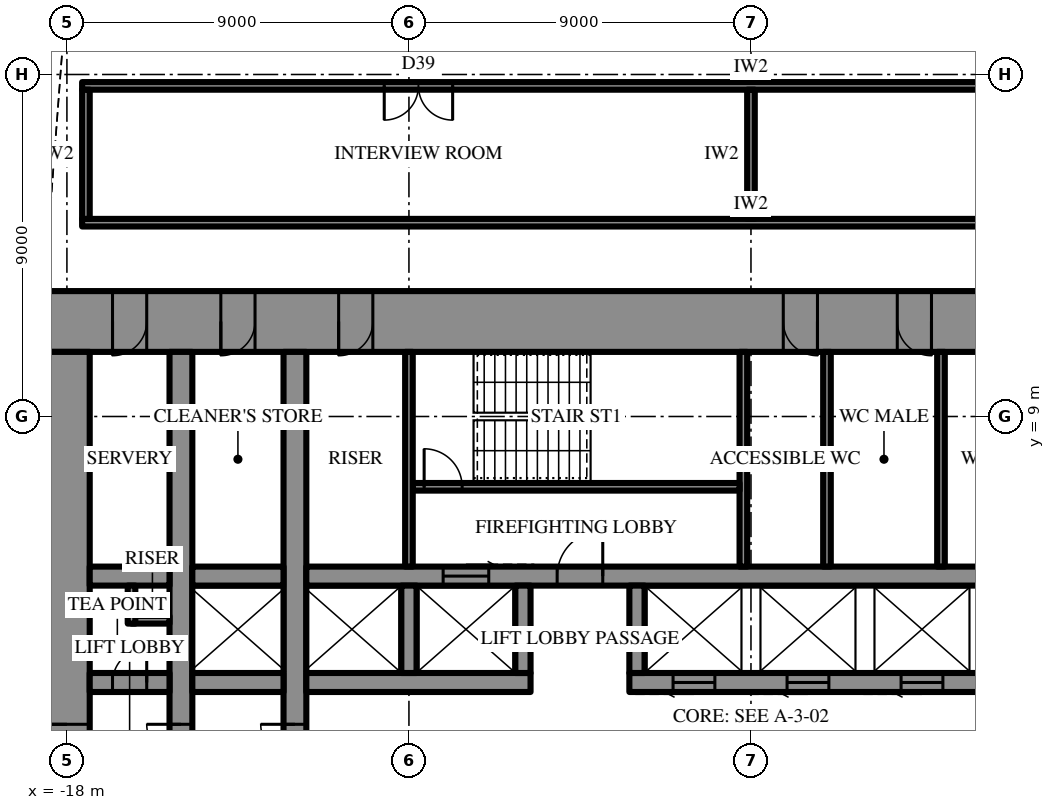
"""IFC4 building model, lengths in metres.
Left out: names, types, materials, properties, quantities, classifications, styles, units other than length and angle.
Written with IfcOpenShell. Run it as: python <this file> out.ifc"""

import sys

from ifc_helpers import new_model, si_unit, direction, frame, frame_2d, origin, place, context, subcontext, project, spatial, rectangle, extrude, element, fill, save


model = new_model("IFC4")
c1 = context("Model", 3, precision=1e-05, world=origin(), true_north=direction((0.0, 1.0)))
c2 = subcontext(c1, "Body", "Model", "MODEL_VIEW")
j1 = project(units=[si_unit("LENGTHUNIT", "METRE"), si_unit("PLANEANGLEUNIT", "RADIAN")], contexts=[c1])
p1 = place(None, origin())
s1 = spatial("IfcSite", under=j1, at=p1, CompositionType="ELEMENT")
p2 = place(p1, origin())
s2 = spatial("IfcBuilding", under=s1, at=p2, CompositionType="ELEMENT")
p3 = place(p2, frame((0.0, 0.0, 169.9)))
s3 = spatial("IfcBuildingStorey", under=s2, at=p3, CompositionType="ELEMENT", Elevation=169.9)
p4 = place(p3, frame((-18.6, 11.5, 0.0), z_axis=(0.0, 0.0, 1.0), x_axis=(1.0, 0.0, 0.0)))
e1 = element("IfcWall", 1, at=p4, inside=s3, PredefinedType="SHEAR", context=c2, shape_type="SweptSolid", body=[
    extrude(rectangle(XDim=37.2, YDim=1.6, at=frame_2d((18.6, 0.0))), origin(), (0.0, 0.0, 1.0), 4.2),
])
p5 = place(p4, frame((19.45, 0.0, 0.0)))
e2 = element("IfcOpeningElement", 2, at=p5, cuts=e1, PredefinedType="OPENING", context=c2, shape_type="SweptSolid", body=[
    extrude(rectangle(XDim=0.9, YDim=2.2, at=frame_2d((0.45, 1.1))), frame((0.0, 0.81, 0.0), z_axis=(0.0, -1.0, 0.0), x_axis=(1.0, 0.0, 0.0)), (0.0, 0.0, 1.0), 1.62),
])
p6 = place(p4, frame((22.45, 0.0, 0.0)))
e3 = element("IfcOpeningElement", 3, at=p6, cuts=e1, PredefinedType="OPENING", context=c2, shape_type="SweptSolid", body=[
    extrude(rectangle(XDim=0.9, YDim=2.2, at=frame_2d((0.45, 1.1))), frame((0.0, 0.81, 0.0), z_axis=(0.0, -1.0, 0.0), x_axis=(1.0, 0.0, 0.0)), (0.0, 0.0, 1.0), 1.62),
])
p7 = place(p4, frame((25.5, 0.0, 0.0)))
e4 = element("IfcOpeningElement", 4, at=p7, cuts=e1, PredefinedType="OPENING", context=c2, shape_type="SweptSolid", body=[
    extrude(rectangle(XDim=1.0, YDim=2.2, at=frame_2d((0.5, 1.1))), frame((0.0, 0.81, 0.0), z_axis=(0.0, -1.0, 0.0), x_axis=(1.0, 0.0, 0.0)), (0.0, 0.0, 1.0), 1.62),
])
p8 = place(p4, frame((1.8, 0.0, 0.0)))
e5 = element("IfcOpeningElement", 5, at=p8, cuts=e1, PredefinedType="OPENING", context=c2, shape_type="SweptSolid", body=[
    extrude(rectangle(XDim=0.9, YDim=2.2, at=frame_2d((0.45, 1.1))), frame((0.0, 0.81, 0.0), z_axis=(0.0, -1.0, 0.0), x_axis=(1.0, 0.0, 0.0)), (0.0, 0.0, 1.0), 1.62),
])
p9 = place(p4, frame((4.65, 0.0, 0.0)))
e6 = element("IfcOpeningElement", 6, at=p9, cuts=e1, PredefinedType="OPENING", context=c2, shape_type="SweptSolid", body=[
    extrude(rectangle(XDim=0.9, YDim=2.2, at=frame_2d((0.45, 1.1))), frame((0.0, 0.81, 0.0), z_axis=(0.0, -1.0, 0.0), x_axis=(1.0, 0.0, 0.0)), (0.0, 0.0, 1.0), 1.62),
])
p10 = place(p4, frame((7.75, 0.0, 0.0)))
e7 = element("IfcOpeningElement", 7, at=p10, cuts=e1, PredefinedType="OPENING", context=c2, shape_type="SweptSolid", body=[
    extrude(rectangle(XDim=0.9, YDim=2.2, at=frame_2d((0.45, 1.1))), frame((0.0, 0.81, 0.0), z_axis=(0.0, -1.0, 0.0), x_axis=(1.0, 0.0, 0.0)), (0.0, 0.0, 1.0), 1.62),
])
p11 = place(p4, frame((28.55, 0.0, 0.0)))
e8 = element("IfcOpeningElement", 8, at=p11, cuts=e1, PredefinedType="OPENING", context=c2, shape_type="SweptSolid", body=[
    extrude(rectangle(XDim=0.9, YDim=2.2, at=frame_2d((0.45, 1.1))), frame((0.0, 0.81, 0.0), z_axis=(0.0, -1.0, 0.0), x_axis=(1.0, 0.0, 0.0)), (0.0, 0.0, 1.0), 1.62),
])
p12 = place(p4, frame((31.65, 0.0, 0.0)))
e9 = element("IfcOpeningElement", 9, at=p12, cuts=e1, PredefinedType="OPENING", context=c2, shape_type="SweptSolid", body=[
    extrude(rectangle(XDim=0.9, YDim=2.2, at=frame_2d((0.45, 1.1))), frame((0.0, 0.81, 0.0), z_axis=(0.0, -1.0, 0.0), x_axis=(1.0, 0.0, 0.0)), (0.0, 0.0, 1.0), 1.62),
])
p13 = place(p4, frame((34.5, 0.0, 0.0)))
e10 = element("IfcOpeningElement", 10, at=p13, cuts=e1, PredefinedType="OPENING", context=c2, shape_type="SweptSolid", body=[
    extrude(rectangle(XDim=0.9, YDim=2.2, at=frame_2d((0.45, 1.1))), frame((0.0, 0.81, 0.0), z_axis=(0.0, -1.0, 0.0), x_axis=(1.0, 0.0, 0.0)), (0.0, 0.0, 1.0), 1.62),
])
p14 = place(p3, frame((-18.0, 10.7, 0.0), z_axis=(0.0, 0.0, 1.0), x_axis=(0.0, -1.0, 0.0)))
e11 = element("IfcWall", 11, at=p14, inside=s3, PredefinedType="SHEAR", context=c2, shape_type="SweptSolid", body=[
    extrude(rectangle(XDim=21.4, YDim=1.2, at=frame_2d((10.7, 0.0))), origin(), (0.0, 0.0, 1.0), 4.2),
])
p15 = place(p14, frame((9.8, 0.0, 0.0)))
e12 = element("IfcOpeningElement", 12, at=p15, cuts=e11, PredefinedType="OPENING", context=c2, shape_type="SweptSolid", body=[
    extrude(rectangle(XDim=1.8, YDim=2.4, at=frame_2d((0.9, 1.2))), frame((0.0, 0.61, 0.0), z_axis=(0.0, -1.0, 0.0), x_axis=(1.0, 0.0, 0.0)), (0.0, 0.0, 1.0), 1.22),
])
p16 = place(p3, frame((-12.0, -10.7, 0.0), z_axis=(0.0, 0.0, 1.0), x_axis=(0.0, 1.0, 0.0)))
e13 = element("IfcWall", 13, at=p16, inside=s3, PredefinedType="SHEAR", context=c2, shape_type="SweptSolid", body=[
    extrude(rectangle(XDim=21.4, YDim=0.6, at=frame_2d((10.7, 0.0))), origin(), (0.0, 0.0, 1.0), 4.2),
])
p17 = place(p16, frame((9.8, 0.0, 0.0)))
e14 = element("IfcOpeningElement", 14, at=p17, cuts=e13, PredefinedType="OPENING", context=c2, shape_type="SweptSolid", body=[
    extrude(rectangle(XDim=1.8, YDim=2.4, at=frame_2d((0.9, 1.2))), frame((0.0, 0.31, 0.0), z_axis=(0.0, -1.0, 0.0), x_axis=(1.0, 0.0, 0.0)), (0.0, 0.0, 1.0), 0.62),
])
p18 = place(p3, frame((-15.0, -10.7, 0.0), z_axis=(0.0, 0.0, 1.0), x_axis=(0.0, 1.0, 0.0)))
e15 = element("IfcWall", 15, at=p18, inside=s3, PredefinedType="SHEAR", context=c2, shape_type="SweptSolid", body=[
    extrude(rectangle(XDim=21.4, YDim=0.6, at=frame_2d((10.7, 0.0))), origin(), (0.0, 0.0, 1.0), 4.2),
])
p19 = place(p18, frame((9.8, 0.0, 0.0)))
e16 = element("IfcOpeningElement", 16, at=p19, cuts=e15, PredefinedType="OPENING", context=c2, shape_type="SweptSolid", body=[
    extrude(rectangle(XDim=1.8, YDim=2.4, at=frame_2d((0.9, 1.2))), frame((0.0, 0.31, 0.0), z_axis=(0.0, -1.0, 0.0), x_axis=(1.0, 0.0, 0.0)), (0.0, 0.0, 1.0), 0.62),
])
p20 = place(p3, frame((-17.4, 2.0, 0.0), z_axis=(0.0, 0.0, 1.0), x_axis=(1.0, 0.0, 0.0)))
e17 = element("IfcWall", 17, at=p20, inside=s3, PredefinedType="SHEAR", context=c2, shape_type="SweptSolid", body=[
    extrude(rectangle(XDim=2.1, YDim=0.5, at=frame_2d((1.05, 0.0))), origin(), (0.0, 0.0, 1.0), 4.2),
])
p21 = place(p20, frame((0.6, 0.0, 0.0)))
e18 = element("IfcOpeningElement", 18, at=p21, cuts=e17, PredefinedType="OPENING", context=c2, shape_type="SweptSolid", body=[
    extrude(rectangle(XDim=0.9, YDim=2.2, at=frame_2d((0.45, 1.1))), frame((0.0, 0.26, 0.0), z_axis=(0.0, -1.0, 0.0), x_axis=(1.0, 0.0, 0.0)), (0.0, 0.0, 1.0), 0.52),
])
p22 = place(p3, frame((-14.7, 2.0, 0.0), z_axis=(0.0, 0.0, 1.0), x_axis=(1.0, 0.0, 0.0)))
e19 = element("IfcWall", 19, at=p22, inside=s3, PredefinedType="SHEAR", context=c2, shape_type="SweptSolid", body=[
    extrude(rectangle(XDim=2.4, YDim=0.5, at=frame_2d((1.2, 0.0))), origin(), (0.0, 0.0, 1.0), 4.2),
])
p23 = place(p3, frame((-11.7, 2.0, 0.0), z_axis=(0.0, 0.0, 1.0), x_axis=(1.0, 0.0, 0.0)))
e20 = element("IfcWall", 20, at=p23, inside=s3, PredefinedType="SHEAR", context=c2, shape_type="SweptSolid", body=[
    extrude(rectangle(XDim=5.9, YDim=0.5, at=frame_2d((2.95, 0.0))), origin(), (0.0, 0.0, 1.0), 4.2),
])
p24 = place(p3, frame((-3.2, 2.0, 0.0), z_axis=(0.0, 0.0, 1.0), x_axis=(1.0, 0.0, 0.0)))
e21 = element("IfcWall", 21, at=p24, inside=s3, PredefinedType="SHEAR", context=c2, shape_type="SweptSolid", body=[
    extrude(rectangle(XDim=14.9, YDim=0.5, at=frame_2d((7.45, 0.0))), origin(), (0.0, 0.0, 1.0), 4.2),
])
p25 = place(p24, frame((1.15, 0.0, 0.0)))
e22 = element("IfcOpeningElement", 22, at=p25, cuts=e21, PredefinedType="OPENING", context=c2, shape_type="SweptSolid", body=[
    extrude(rectangle(XDim=1.1, YDim=2.2, at=frame_2d((0.55, 1.1))), frame((0.0, 0.26, 0.0), z_axis=(0.0, -1.0, 0.0), x_axis=(1.0, 0.0, 0.0)), (0.0, 0.0, 1.0), 0.52),
])
p26 = place(p24, frame((4.15, 0.0, 0.0)))
e23 = element("IfcOpeningElement", 23, at=p26, cuts=e21, PredefinedType="OPENING", context=c2, shape_type="SweptSolid", body=[
    extrude(rectangle(XDim=1.1, YDim=2.2, at=frame_2d((0.55, 1.1))), frame((0.0, 0.26, 0.0), z_axis=(0.0, -1.0, 0.0), x_axis=(1.0, 0.0, 0.0)), (0.0, 0.0, 1.0), 0.52),
])
p27 = place(p24, frame((7.15, 0.0, 0.0)))
e24 = element("IfcOpeningElement", 24, at=p27, cuts=e21, PredefinedType="OPENING", context=c2, shape_type="SweptSolid", body=[
    extrude(rectangle(XDim=1.1, YDim=2.2, at=frame_2d((0.55, 1.1))), frame((0.0, 0.26, 0.0), z_axis=(0.0, -1.0, 0.0), x_axis=(1.0, 0.0, 0.0)), (0.0, 0.0, 1.0), 0.52),
])
p28 = place(p24, frame((10.15, 0.0, 0.0)))
e25 = element("IfcOpeningElement", 25, at=p28, cuts=e21, PredefinedType="OPENING", context=c2, shape_type="SweptSolid", body=[
    extrude(rectangle(XDim=1.1, YDim=2.2, at=frame_2d((0.55, 1.1))), frame((0.0, 0.26, 0.0), z_axis=(0.0, -1.0, 0.0), x_axis=(1.0, 0.0, 0.0)), (0.0, 0.0, 1.0), 0.52),
])
p29 = place(p3, frame((-17.4, 4.8, 0.0), z_axis=(0.0, 0.0, 1.0), x_axis=(1.0, 0.0, 0.0)))
e26 = element("IfcWall", 26, at=p29, inside=s3, PredefinedType="SHEAR", context=c2, shape_type="SweptSolid", body=[
    extrude(rectangle(XDim=2.1, YDim=0.5, at=frame_2d((1.05, 0.0))), origin(), (0.0, 0.0, 1.0), 4.2),
])
p30 = place(p3, frame((-14.7, 4.8, 0.0), z_axis=(0.0, 0.0, 1.0), x_axis=(1.0, 0.0, 0.0)))
e27 = element("IfcWall", 27, at=p30, inside=s3, PredefinedType="SHEAR", context=c2, shape_type="SweptSolid", body=[
    extrude(rectangle(XDim=2.4, YDim=0.5, at=frame_2d((1.2, 0.0))), origin(), (0.0, 0.0, 1.0), 4.2),
])
p31 = place(p3, frame((-11.7, 4.8, 0.0), z_axis=(0.0, 0.0, 1.0), x_axis=(1.0, 0.0, 0.0)))
e28 = element("IfcWall", 28, at=p31, inside=s3, PredefinedType="SHEAR", context=c2, shape_type="SweptSolid", body=[
    extrude(rectangle(XDim=23.4, YDim=0.5, at=frame_2d((11.7, 0.0))), origin(), (0.0, 0.0, 1.0), 4.2),
])
p32 = place(p31, frame((6.6, 0.0, 0.0)))
e29 = element("IfcOpeningElement", 29, at=p32, cuts=e28, PredefinedType="OPENING", context=c2, shape_type="SweptSolid", body=[
    extrude(rectangle(XDim=1.2, YDim=2.2, at=frame_2d((0.6, 1.1))), frame((0.0, 0.26, 0.0), z_axis=(0.0, -1.0, 0.0), x_axis=(1.0, 0.0, 0.0)), (0.0, 0.0, 1.0), 0.52),
])
p33 = place(p31, frame((3.6, 0.0, 0.0)))
e30 = element("IfcOpeningElement", 30, at=p33, cuts=e28, PredefinedType="OPENING", context=c2, shape_type="SweptSolid", body=[
    extrude(rectangle(XDim=1.2, YDim=2.2, at=frame_2d((0.6, 1.1))), frame((0.0, 0.26, 0.0), z_axis=(0.0, -1.0, 0.0), x_axis=(1.0, 0.0, 0.0)), (0.0, 0.0, 1.0), 0.52),
])
for number, where, z_axis, x_axis in (
    (31, (-9.0, 2.25, 0.0), (0.0, 0.0, 1.0), (0.0, 1.0, 0.0)),
    (32, (-6.0, 2.25, 0.0), (0.0, 0.0, 1.0), (0.0, 1.0, 0.0)),
    (33, (-3.0, 2.25, 0.0), (0.0, 0.0, 1.0), (0.0, 1.0, 0.0)),
):
    element("IfcWall", number, at=place(p3, frame(where, z_axis=z_axis, x_axis=x_axis)), inside=s3, PredefinedType="SHEAR", context=c2, shape_type="SweptSolid", body=[
        extrude(rectangle(XDim=2.3, YDim=0.4, at=frame_2d((1.15, 0.0))), origin(), (0.0, 0.0, 1.0), 4.2),
    ])
p34 = place(p3, frame((-0.2, 5.05, 0.0), z_axis=(0.0, 0.0, 1.0), x_axis=(0.0, 1.0, 0.0)))
e34 = element("IfcWall", 34, at=p34, inside=s3, PredefinedType="SHEAR", context=c2, shape_type="SweptSolid", body=[
    extrude(rectangle(XDim=5.65, YDim=0.2, at=frame_2d((2.825, 0.0))), origin(), (0.0, 0.0, 1.0), 4.2),
])
p35 = place(p3, frame((-8.9, 7.15, 0.0), z_axis=(0.0, 0.0, 1.0), x_axis=(1.0, 0.0, 0.0)))
e35 = element("IfcWall", 35, at=p35, inside=s3, PredefinedType="SHEAR", context=c2, shape_type="SweptSolid", body=[
    extrude(rectangle(XDim=8.6, YDim=0.2, at=frame_2d((4.3, 0.0))), origin(), (0.0, 0.0, 1.0), 4.2),
])
p36 = place(p35, frame((0.3, 0.0, 0.0)))
e36 = element("IfcOpeningElement", 36, at=p36, cuts=e35, PredefinedType="OPENING", context=c2, shape_type="SweptSolid", body=[
    extrude(rectangle(XDim=1.0, YDim=2.2, at=frame_2d((0.5, 1.1))), frame((0.0, 0.11, 0.0), z_axis=(0.0, -1.0, 0.0), x_axis=(1.0, 0.0, 0.0)), (0.0, 0.0, 1.0), 0.22),
])
for number, where, z_axis, x_axis in (
    (37, (-9.0, 5.05, 0.0), (0.0, 0.0, 1.0), (0.0, 1.0, 0.0)),
    (38, (2.0, 5.05, 0.0), (0.0, 0.0, 1.0), (0.0, 1.0, 0.0)),
    (39, (5.0, 5.05, 0.0), (0.0, 0.0, 1.0), (0.0, 1.0, 0.0)),
):
    element("IfcWall", number, at=place(p3, frame(where, z_axis=z_axis, x_axis=x_axis)), inside=s3, PredefinedType="PARTITIONING", context=c2, shape_type="SweptSolid", body=[
        extrude(rectangle(XDim=5.65, YDim=0.2, at=frame_2d((2.825, 0.0))), origin(), (0.0, 0.0, 1.0), 4.0),
    ])
for number, where, z_axis, x_axis in (
    (40, (-16.3, 3.65, 0.0), (0.0, 0.0, 1.0), (1.0, 0.0, 0.0)),
    (41, (-16.3, 3.55, 0.0), (0.0, 0.0, 1.0), (0.0, 1.0, 0.0)),
):
    element("IfcWall", number, at=place(p3, frame(where, z_axis=z_axis, x_axis=x_axis)), inside=s3, PredefinedType="PARTITIONING", context=c2, shape_type="SweptSolid", body=[
        extrude(rectangle(XDim=1.0, YDim=0.2, at=frame_2d((0.5, 0.0))), origin(), (0.0, 0.0, 1.0), 4.0),
    ])
p37 = place(p3, frame((-17.6, 14.1, 0.0), z_axis=(0.0, 0.0, 1.0), x_axis=(1.0, 0.0, 0.0)))
e42 = element("IfcWall", 42, at=p37, inside=s3, PredefinedType="PARTITIONING", context=c2, shape_type="SweptSolid", body=[
    extrude(rectangle(XDim=35.2, YDim=0.2, at=frame_2d((17.6, 0.0))), origin(), (0.0, 0.0, 1.0), 4.0),
])
p38 = place(p3, frame((-17.6, 17.7, 0.0), z_axis=(0.0, 0.0, 1.0), x_axis=(1.0, 0.0, 0.0)))
e43 = element("IfcWall", 43, at=p38, inside=s3, PredefinedType="PARTITIONING", context=c2, shape_type="SweptSolid", body=[
    extrude(rectangle(XDim=35.2, YDim=0.2, at=frame_2d((17.6, 0.0))), origin(), (0.0, 0.0, 1.0), 4.0),
])
p39 = place(p38, frame((7.95, 0.0, 0.0)))
e44 = element("IfcOpeningElement", 44, at=p39, cuts=e43, PredefinedType="OPENING", context=c2, shape_type="SweptSolid", body=[
    extrude(rectangle(XDim=1.8, YDim=2.4, at=frame_2d((0.9, 1.2))), frame((0.0, 0.11, 0.0), z_axis=(0.0, -1.0, 0.0), x_axis=(1.0, 0.0, 0.0)), (0.0, 0.0, 1.0), 0.22),
])
p40 = place(p38, frame((25.45, 0.0, 0.0)))
e45 = element("IfcOpeningElement", 45, at=p40, cuts=e43, PredefinedType="OPENING", context=c2, shape_type="SweptSolid", body=[
    extrude(rectangle(XDim=1.8, YDim=2.4, at=frame_2d((0.9, 1.2))), frame((0.0, 0.11, 0.0), z_axis=(0.0, -1.0, 0.0), x_axis=(1.0, 0.0, 0.0)), (0.0, 0.0, 1.0), 0.22),
])
p41 = place(p3, frame((-17.5, 14.2, 0.0), z_axis=(0.0, 0.0, 1.0), x_axis=(0.0, 1.0, 0.0)))
e46 = element("IfcWall", 46, at=p41, inside=s3, PredefinedType="PARTITIONING", context=c2, shape_type="SweptSolid", body=[
    extrude(rectangle(XDim=3.4, YDim=0.2, at=frame_2d((1.7, 0.0))), origin(), (0.0, 0.0, 1.0), 4.0),
])
p42 = place(p3, frame((0.0, 14.2, 0.0), z_axis=(0.0, 0.0, 1.0), x_axis=(0.0, 1.0, 0.0)))
e47 = element("IfcWall", 47, at=p42, inside=s3, PredefinedType="PARTITIONING", context=c2, shape_type="SweptSolid", body=[
    extrude(rectangle(XDim=3.4, YDim=0.2, at=frame_2d((1.7, 0.0))), origin(), (0.0, 0.0, 1.0), 2.992),
])
p43 = place(p15, frame((1.8, 0.0, 0.0), z_axis=(0.0, 0.0, 1.0), x_axis=(-1.0, 0.0, 0.0)))
e48 = element("IfcDoor", 48, at=p43, inside=s3, OperationType="DOUBLE_DOOR_SINGLE_SWING", PredefinedType="DOOR", context=c2, shape_type="SweptSolid", body=[
    extrude(rectangle(XDim=1.8, YDim=2.4, at=frame_2d((0.9, 1.2))), frame((0.0, 0.025, 0.0), z_axis=(0.0, -1.0, 0.0), x_axis=(1.0, 0.0, 0.0)), (0.0, 0.0, 1.0), 0.05),
])
fill(e12, e48)
p44 = place(p32, origin())
e49 = element("IfcDoor", 49, at=p44, inside=s3, OperationType="SINGLE_SWING_LEFT", PredefinedType="DOOR", context=c2, shape_type="SweptSolid", body=[
    extrude(rectangle(XDim=1.2, YDim=2.2, at=frame_2d((0.6, 1.1))), frame((0.0, 0.025, 0.0), z_axis=(0.0, -1.0, 0.0), x_axis=(1.0, 0.0, 0.0)), (0.0, 0.0, 1.0), 0.05),
])
fill(e29, e49)
p45 = place(p36, origin())
e50 = element("IfcDoor", 50, at=p45, inside=s3, OperationType="SINGLE_SWING_RIGHT", PredefinedType="DOOR", context=c2, shape_type="SweptSolid", body=[
    extrude(rectangle(XDim=1.0, YDim=2.2, at=frame_2d((0.5, 1.1))), frame((0.0, 0.025, 0.0), z_axis=(0.0, -1.0, 0.0), x_axis=(1.0, 0.0, 0.0)), (0.0, 0.0, 1.0), 0.05),
])
fill(e36, e50)
p46 = place(p5, frame((0.9, 0.0, 0.0), z_axis=(0.0, 0.0, 1.0), x_axis=(-1.0, 0.0, 0.0)))
e51 = element("IfcDoor", 51, at=p46, inside=s3, OperationType="SINGLE_SWING_RIGHT", PredefinedType="DOOR", context=c2, shape_type="SweptSolid", body=[
    extrude(rectangle(XDim=0.9, YDim=2.2, at=frame_2d((0.45, 1.1))), frame((0.0, 0.025, 0.0), z_axis=(0.0, -1.0, 0.0), x_axis=(1.0, 0.0, 0.0)), (0.0, 0.0, 1.0), 0.05),
])
fill(e2, e51)
p47 = place(p6, frame((0.9, 0.0, 0.0), z_axis=(0.0, 0.0, 1.0), x_axis=(-1.0, 0.0, 0.0)))
e52 = element("IfcDoor", 52, at=p47, inside=s3, OperationType="SINGLE_SWING_RIGHT", PredefinedType="DOOR", context=c2, shape_type="SweptSolid", body=[
    extrude(rectangle(XDim=0.9, YDim=2.2, at=frame_2d((0.45, 1.1))), frame((0.0, 0.025, 0.0), z_axis=(0.0, -1.0, 0.0), x_axis=(1.0, 0.0, 0.0)), (0.0, 0.0, 1.0), 0.05),
])
fill(e3, e52)
p48 = place(p8, frame((0.9, 0.0, 0.0), z_axis=(0.0, 0.0, 1.0), x_axis=(-1.0, 0.0, 0.0)))
e53 = element("IfcDoor", 53, at=p48, inside=s3, OperationType="SINGLE_SWING_LEFT", PredefinedType="DOOR", context=c2, shape_type="SweptSolid", body=[
    extrude(rectangle(XDim=0.9, YDim=2.2, at=frame_2d((0.45, 1.1))), frame((0.0, 0.025, 0.0), z_axis=(0.0, -1.0, 0.0), x_axis=(1.0, 0.0, 0.0)), (0.0, 0.0, 1.0), 0.05),
])
fill(e5, e53)
p49 = place(p9, frame((0.9, 0.0, 0.0), z_axis=(0.0, 0.0, 1.0), x_axis=(-1.0, 0.0, 0.0)))
e54 = element("IfcDoor", 54, at=p49, inside=s3, OperationType="SINGLE_SWING_LEFT", PredefinedType="DOOR", context=c2, shape_type="SweptSolid", body=[
    extrude(rectangle(XDim=0.9, YDim=2.2, at=frame_2d((0.45, 1.1))), frame((0.0, 0.025, 0.0), z_axis=(0.0, -1.0, 0.0), x_axis=(1.0, 0.0, 0.0)), (0.0, 0.0, 1.0), 0.05),
])
fill(e6, e54)
p50 = place(p10, frame((0.9, 0.0, 0.0), z_axis=(0.0, 0.0, 1.0), x_axis=(-1.0, 0.0, 0.0)))
e55 = element("IfcDoor", 55, at=p50, inside=s3, OperationType="SINGLE_SWING_LEFT", PredefinedType="DOOR", context=c2, shape_type="SweptSolid", body=[
    extrude(rectangle(XDim=0.9, YDim=2.2, at=frame_2d((0.45, 1.1))), frame((0.0, 0.025, 0.0), z_axis=(0.0, -1.0, 0.0), x_axis=(1.0, 0.0, 0.0)), (0.0, 0.0, 1.0), 0.05),
])
fill(e7, e55)
p51 = place(p21, origin())
e56 = element("IfcDoor", 56, at=p51, inside=s3, OperationType="SINGLE_SWING_LEFT", PredefinedType="DOOR", context=c2, shape_type="SweptSolid", body=[
    extrude(rectangle(XDim=0.9, YDim=2.2, at=frame_2d((0.45, 1.1))), frame((0.0, 0.025, 0.0), z_axis=(0.0, -1.0, 0.0), x_axis=(1.0, 0.0, 0.0)), (0.0, 0.0, 1.0), 0.05),
])
fill(e18, e56)
p52 = place(p17, origin())
e57 = element("IfcDoor", 57, at=p52, inside=s3, OperationType="DOUBLE_DOOR_SINGLE_SWING", PredefinedType="DOOR", context=c2, shape_type="SweptSolid", body=[
    extrude(rectangle(XDim=1.8, YDim=2.4, at=frame_2d((0.9, 1.2))), frame((0.0, 0.025, 0.0), z_axis=(0.0, -1.0, 0.0), x_axis=(1.0, 0.0, 0.0)), (0.0, 0.0, 1.0), 0.05),
])
fill(e14, e57)
p53 = place(p19, origin())
e58 = element("IfcDoor", 58, at=p53, inside=s3, OperationType="DOUBLE_DOOR_SINGLE_SWING", PredefinedType="DOOR", context=c2, shape_type="SweptSolid", body=[
    extrude(rectangle(XDim=1.8, YDim=2.4, at=frame_2d((0.9, 1.2))), frame((0.0, 0.025, 0.0), z_axis=(0.0, -1.0, 0.0), x_axis=(1.0, 0.0, 0.0)), (0.0, 0.0, 1.0), 0.05),
])
fill(e16, e58)
p54 = place(p33, origin())
e59 = element("IfcDoor", 59, at=p54, inside=s3, OperationType="SLIDING_TO_LEFT", PredefinedType="DOOR", context=c2, shape_type="SweptSolid", body=[
    extrude(rectangle(XDim=1.2, YDim=2.2, at=frame_2d((0.6, 1.1))), frame((0.0, 0.025, 0.0), z_axis=(0.0, -1.0, 0.0), x_axis=(1.0, 0.0, 0.0)), (0.0, 0.0, 1.0), 0.05),
])
fill(e30, e59)
p55 = place(p25, frame((1.1, 0.0, 0.0), z_axis=(0.0, 0.0, 1.0), x_axis=(-1.0, 0.0, 0.0)))
e60 = element("IfcDoor", 60, at=p55, inside=s3, OperationType="SLIDING_TO_LEFT", PredefinedType="DOOR", context=c2, shape_type="SweptSolid", body=[
    extrude(rectangle(XDim=1.1, YDim=2.2, at=frame_2d((0.55, 1.1))), frame((0.0, 0.025, 0.0), z_axis=(0.0, -1.0, 0.0), x_axis=(1.0, 0.0, 0.0)), (0.0, 0.0, 1.0), 0.05),
])
fill(e22, e60)
p56 = place(p26, frame((1.1, 0.0, 0.0), z_axis=(0.0, 0.0, 1.0), x_axis=(-1.0, 0.0, 0.0)))
e61 = element("IfcDoor", 61, at=p56, inside=s3, OperationType="SLIDING_TO_LEFT", PredefinedType="DOOR", context=c2, shape_type="SweptSolid", body=[
    extrude(rectangle(XDim=1.1, YDim=2.2, at=frame_2d((0.55, 1.1))), frame((0.0, 0.025, 0.0), z_axis=(0.0, -1.0, 0.0), x_axis=(1.0, 0.0, 0.0)), (0.0, 0.0, 1.0), 0.05),
])
fill(e23, e61)
p57 = place(p27, frame((1.1, 0.0, 0.0), z_axis=(0.0, 0.0, 1.0), x_axis=(-1.0, 0.0, 0.0)))
e62 = element("IfcDoor", 62, at=p57, inside=s3, OperationType="SLIDING_TO_LEFT", PredefinedType="DOOR", context=c2, shape_type="SweptSolid", body=[
    extrude(rectangle(XDim=1.1, YDim=2.2, at=frame_2d((0.55, 1.1))), frame((0.0, 0.025, 0.0), z_axis=(0.0, -1.0, 0.0), x_axis=(1.0, 0.0, 0.0)), (0.0, 0.0, 1.0), 0.05),
])
fill(e24, e62)
p58 = place(p39, frame((1.8, 0.0, 0.0), z_axis=(0.0, 0.0, 1.0), x_axis=(-1.0, 0.0, 0.0)))
e63 = element("IfcDoor", 63, at=p58, inside=s3, OperationType="DOUBLE_DOOR_SINGLE_SWING", PredefinedType="DOOR", context=c2, shape_type="SweptSolid", body=[
    extrude(rectangle(XDim=1.8, YDim=2.4, at=frame_2d((0.9, 1.2))), frame((0.0, 0.025, 0.0), z_axis=(0.0, -1.0, 0.0), x_axis=(1.0, 0.0, 0.0)), (0.0, 0.0, 1.0), 0.05),
])
fill(e44, e63)
save(model, sys.argv[1])
